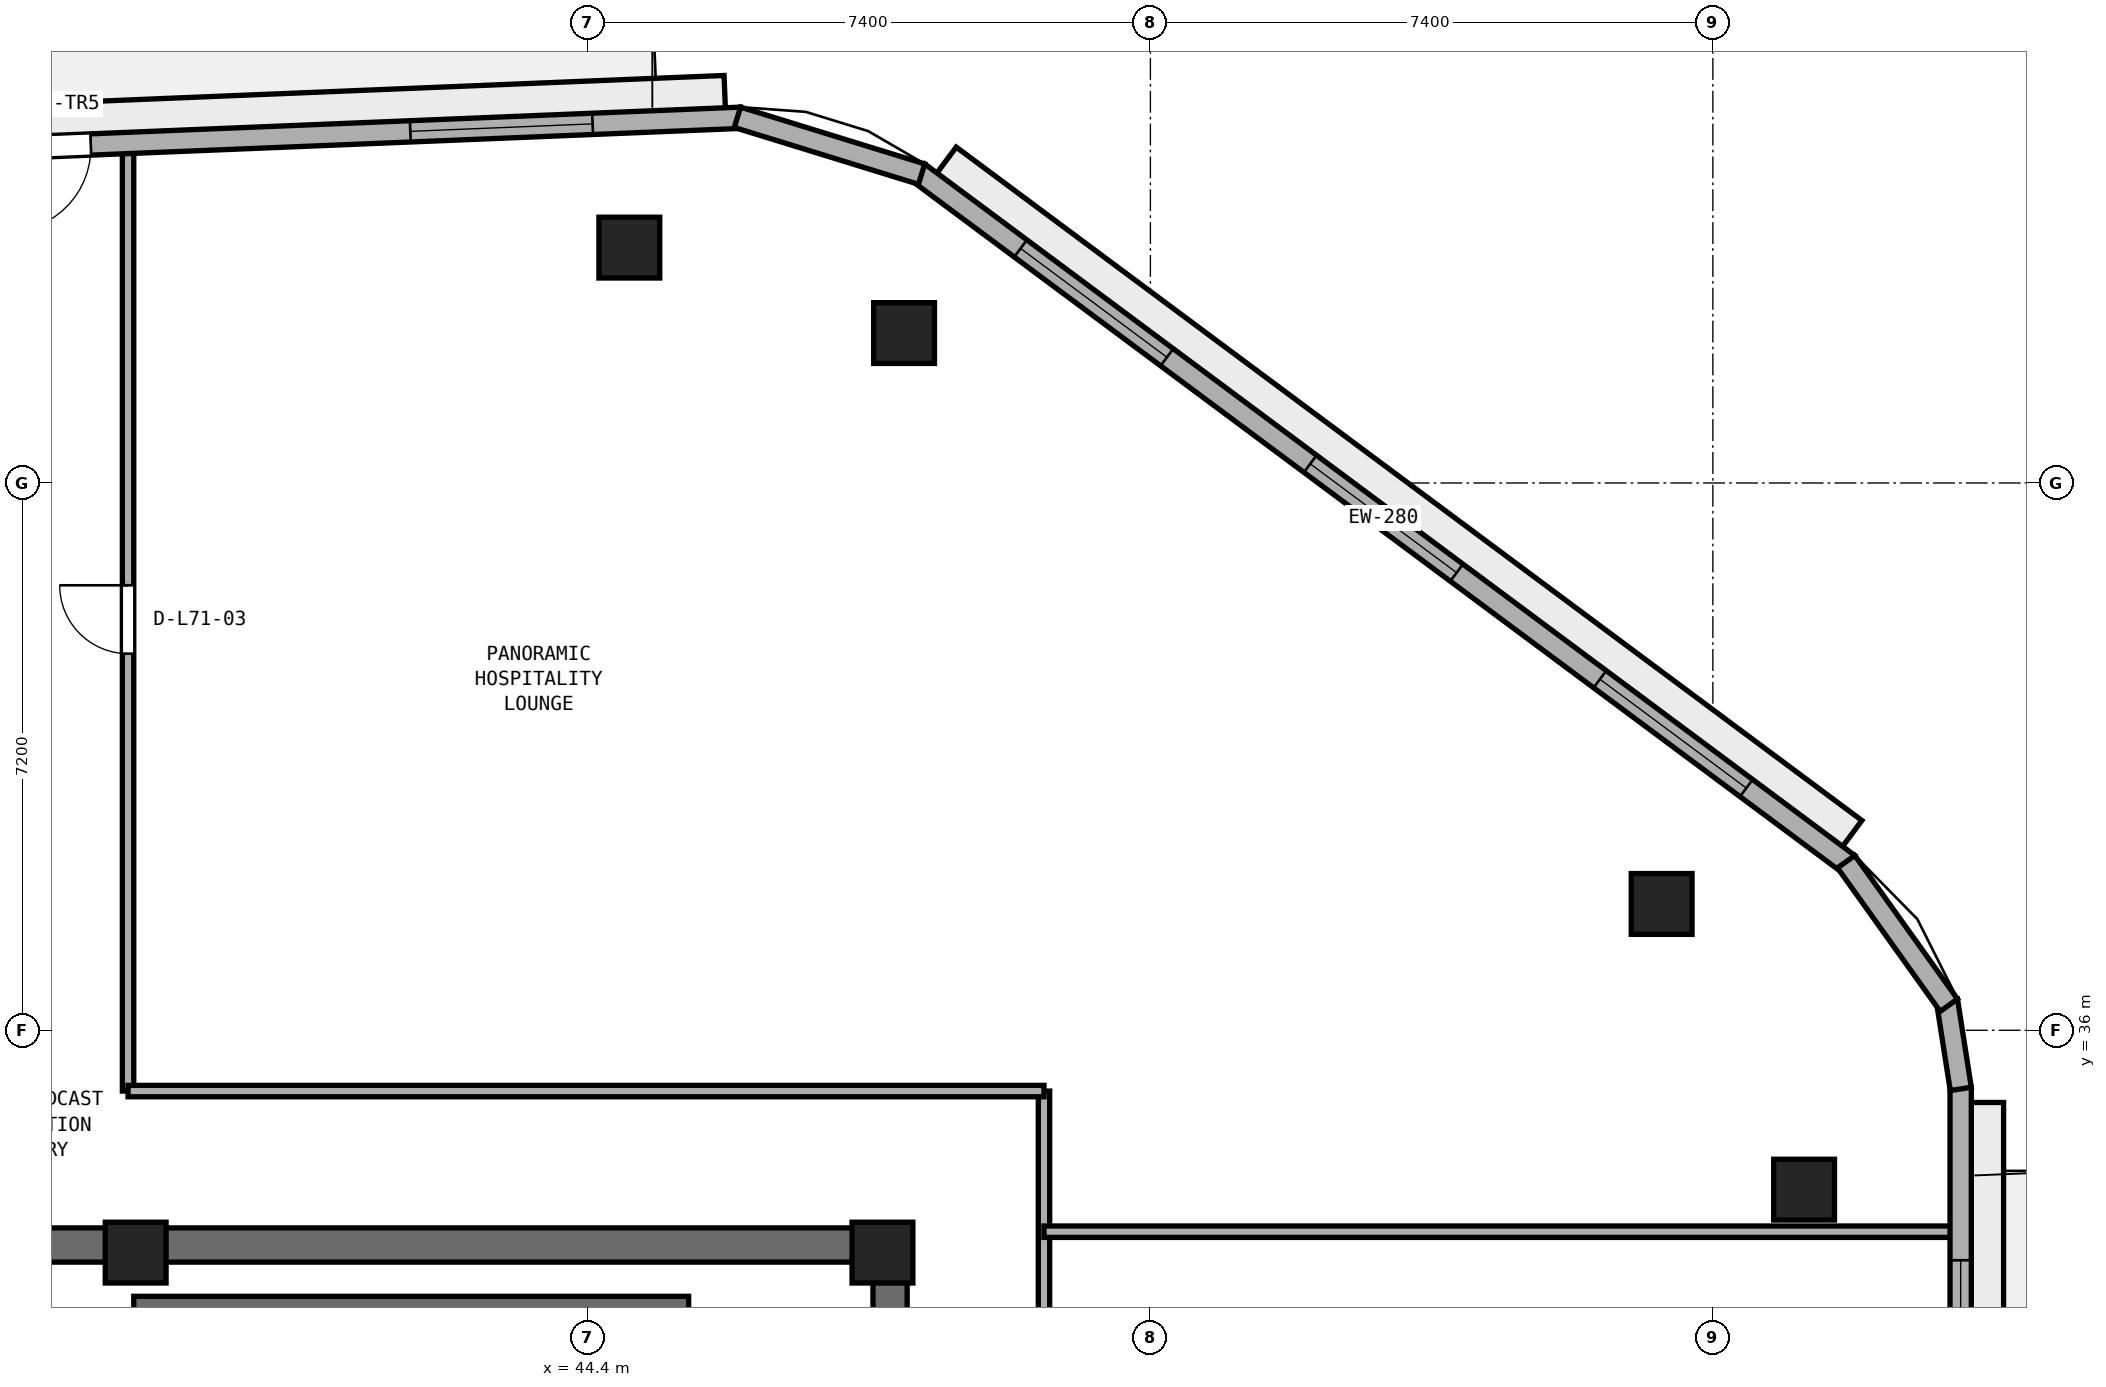
"""IFC4 building model, lengths in metres.
Left out: names, types, materials, properties, quantities, classifications, styles, units other than length and angle.
Written with IfcOpenShell. Run it as: python <this file> out.ifc"""

import sys

from ifc_helpers import new_model, si_unit, direction, frame, frame_2d, origin, origin_2d, place, context, subcontext, project, spatial, rectangle, extrude, element, fill, save


model = new_model("IFC4")
c1 = context("Model", 3, precision=1e-05, world=origin(), true_north=direction((0.0, 1.0)))
c2 = subcontext(c1, "Body", "Model", "MODEL_VIEW")
j1 = project(units=[si_unit("LENGTHUNIT", "METRE"), si_unit("PLANEANGLEUNIT", "RADIAN")], contexts=[c1])
p1 = place(None, origin())
s1 = spatial("IfcSite", under=j1, at=p1, CompositionType="ELEMENT")
p2 = place(p1, origin())
s2 = spatial("IfcBuilding", under=s1, at=p2, CompositionType="ELEMENT")
p3 = place(p2, frame((0.0, 0.0, 278.2)))
s3 = spatial("IfcBuildingStorey", under=s2, at=p3, CompositionType="ELEMENT", Elevation=278.2)
p4 = place(p3, frame((25.4, 33.175, 0.0), z_axis=(0.0, 0.0, 1.0), x_axis=(1.0, 0.0, 0.0)))
e1 = element("IfcWall", 1, at=p4, inside=s3, PredefinedType="SHEAR", context=c2, shape_type="SweptSolid", body=[
    extrude(rectangle(XDim=23.2, YDim=0.45, at=frame_2d((11.6, 0.0))), origin(), (0.0, 0.0, 1.0), 3.54),
])
p5 = place(p3, frame((48.375, 17.45, 0.0), z_axis=(0.0, 0.0, 1.0), x_axis=(0.0, 1.0, 0.0)))
e2 = element("IfcWall", 2, at=p5, inside=s3, PredefinedType="SHEAR", context=c2, shape_type="SweptSolid", body=[
    extrude(rectangle(XDim=15.5, YDim=0.45, at=frame_2d((7.75, 0.0))), origin(), (0.0, 0.0, 1.0), 3.54),
])
p6 = place(p5, frame((5.85, 0.0, 0.0)))
e3 = element("IfcOpeningElement", 3, at=p6, cuts=e2, PredefinedType="OPENING", context=c2, shape_type="SweptSolid", body=[
    extrude(rectangle(XDim=1.5, YDim=2.15, at=frame_2d((0.75, 1.075))), frame((0.0, 0.235, 0.0), z_axis=(0.0, -1.0, 0.0), x_axis=(1.0, 0.0, 0.0)), (0.0, 0.0, 1.0), 0.47),
])
for number, where, z_axis, x_axis in (
    (4, (48.275, 33.075, 0.0), (0.0, 0.0, 1.0), (1.0, 0.0, 0.0)),
    (5, (38.45, 33.075, 0.0), (0.0, 0.0, 1.0), (1.0, 0.0, 0.0)),
):
    element("IfcColumn", number, at=place(p3, frame(where, z_axis=z_axis, x_axis=x_axis)), inside=s3, PredefinedType="PILASTER", context=c2, shape_type="SweptSolid", body=[
        extrude(rectangle(XDim=0.8, YDim=0.8, at=origin_2d()), origin(), (0.0, 0.0, 1.0), 3.8),
    ])
for number, where, z_axis, x_axis in (
    (6, (60.4, 33.903, 0.0), (0.0, 0.0, 1.0), (1.0, 0.0, 0.0)),
    (7, (58.526, 37.662, 0.0), (0.0, 0.0, 1.0), (1.0, 0.0, 0.0)),
    (8, (48.559, 45.173, 0.0), (0.0, 0.0, 1.0), (1.0, 0.0, 0.0)),
    (9, (44.945, 46.297, 0.0), (0.0, 0.0, 1.0), (1.0, 0.0, 0.0)),
):
    element("IfcColumn", number, at=place(p3, frame(where, z_axis=z_axis, x_axis=x_axis)), inside=s3, PredefinedType="COLUMN", context=c2, shape_type="SweptSolid", body=[
        extrude(rectangle(XDim=0.8, YDim=0.8, at=origin_2d()), origin(), (0.0, 0.0, 1.0), 3.8),
    ])
p7 = place(p3, frame((38.425, 32.375, 0.0), z_axis=(0.0, 0.0, 1.0), x_axis=(1.0, 0.0, 0.0)))
e10 = element("IfcWall", 10, at=p7, inside=s3, PredefinedType="SHEAR", context=c2, shape_type="SweptSolid", body=[
    extrude(rectangle(XDim=7.3, YDim=0.25, at=frame_2d((3.65, 0.0))), origin(), (0.0, 0.0, 1.0), 3.54),
])
p8 = place(p3, frame((50.4, 22.6, 0.0), z_axis=(0.0, 0.0, 1.0), x_axis=(0.0, 1.0, 0.0)))
e11 = element("IfcWall", 11, at=p8, inside=s3, PredefinedType="PARTITIONING", context=c2, shape_type="SweptSolid", body=[
    extrude(rectangle(XDim=12.6, YDim=0.15, at=frame_2d((6.3, 0.0))), origin(), (0.0, 0.0, 1.0), 3.54),
])
p9 = place(p8, frame((3.22, 0.0, 0.0)))
e12 = element("IfcOpeningElement", 12, at=p9, cuts=e11, PredefinedType="OPENING", context=c2, shape_type="SweptSolid", body=[
    extrude(rectangle(XDim=1.0, YDim=2.12, at=frame_2d((0.5, 1.06))), frame((0.0, 0.085, 0.0), z_axis=(0.0, -1.0, 0.0), x_axis=(1.0, 0.0, 0.0)), (0.0, 0.0, 1.0), 0.17),
])
p10 = place(p8, frame((8.525, 0.0, 0.0)))
e13 = element("IfcOpeningElement", 13, at=p10, cuts=e11, PredefinedType="OPENING", context=c2, shape_type="SweptSolid", body=[
    extrude(rectangle(XDim=0.9, YDim=2.1, at=frame_2d((0.45, 1.05))), frame((0.0, 0.085, 0.0), z_axis=(0.0, -1.0, 0.0), x_axis=(1.0, 0.0, 0.0)), (0.0, 0.0, 1.0), 0.17),
])
p11 = place(p3, frame((38.35, 35.2, 0.0), z_axis=(0.0, 0.0, 1.0), x_axis=(0.0, 1.0, 0.0)))
e14 = element("IfcWall", 14, at=p11, inside=s3, PredefinedType="PARTITIONING", context=c2, shape_type="SweptSolid", body=[
    extrude(rectangle(XDim=12.409, YDim=0.15, at=frame_2d((6.204, 0.0))), origin(), (0.0, 0.0, 1.0), 3.54),
])
p12 = place(p11, frame((5.754, 0.0, 0.0)))
e15 = element("IfcOpeningElement", 15, at=p12, cuts=e14, PredefinedType="OPENING", context=c2, shape_type="SweptSolid", body=[
    extrude(rectangle(XDim=0.9, YDim=2.1, at=frame_2d((0.45, 1.05))), frame((0.0, 0.085, 0.0), z_axis=(0.0, -1.0, 0.0), x_axis=(1.0, 0.0, 0.0)), (0.0, 0.0, 1.0), 0.17),
])
p13 = place(p3, frame((50.4, 33.35, 0.0), z_axis=(0.0, 0.0, 1.0), x_axis=(1.0, 0.0, 0.0)))
e16 = element("IfcWall", 16, at=p13, inside=s3, PredefinedType="PARTITIONING", context=c2, shape_type="SweptSolid", body=[
    extrude(rectangle(XDim=11.995, YDim=0.15, at=frame_2d((5.998, 0.0))), origin(), (0.0, 0.0, 1.0), 2.923),
])
p14 = place(p3, frame((38.35, 35.2, 0.0), z_axis=(0.0, 0.0, 1.0), x_axis=(1.0, 0.0, 0.0)))
e17 = element("IfcWall", 17, at=p14, inside=s3, PredefinedType="PARTITIONING", context=c2, shape_type="SweptSolid", body=[
    extrude(rectangle(XDim=12.05, YDim=0.15, at=frame_2d((6.025, 0.0))), origin(), (0.0, 0.0, 1.0), 3.54),
])
p15 = place(p3, frame((62.46, 16.396, 0.0), z_axis=(0.0, 0.0, 1.0), x_axis=(0.0, 1.0, 0.0)))
e18 = element("IfcWall", 18, at=p15, inside=s3, PredefinedType="STANDARD", context=c2, shape_type="SweptSolid", body=[
    extrude(rectangle(XDim=18.854, YDim=0.28, at=frame_2d((9.427, 0.0))), origin(), (0.0, 0.0, 1.0), 3.54),
])
p16 = place(p15, frame((8.877, 0.0, 0.0)))
e19 = element("IfcOpeningElement", 19, at=p16, cuts=e18, PredefinedType="OPENING", context=c2, shape_type="SweptSolid", body=[
    extrude(rectangle(XDim=1.1, YDim=2.2, at=frame_2d((0.55, 1.1))), frame((0.0, 0.15, 0.0), z_axis=(0.0, -1.0, 0.0), x_axis=(1.0, 0.0, 0.0)), (0.0, 0.0, 1.0), 0.3),
])
p17 = place(p15, frame((2.276, 0.0, 0.9)))
e20 = element("IfcOpeningElement", 20, at=p17, cuts=e18, PredefinedType="OPENING", context=c2, shape_type="SweptSolid", body=[
    extrude(rectangle(XDim=2.4, YDim=1.75, at=frame_2d((1.2, 0.875))), frame((0.0, 0.15, 0.0), z_axis=(0.0, -1.0, 0.0), x_axis=(1.0, 0.0, 0.0)), (0.0, 0.0, 1.0), 0.3),
])
p18 = place(p15, frame((14.179, 0.0, 0.9)))
e21 = element("IfcOpeningElement", 21, at=p18, cuts=e18, PredefinedType="OPENING", context=c2, shape_type="SweptSolid", body=[
    extrude(rectangle(XDim=2.4, YDim=1.75, at=frame_2d((1.2, 0.875))), frame((0.0, 0.15, 0.0), z_axis=(0.0, -1.0, 0.0), x_axis=(1.0, 0.0, 0.0)), (0.0, 0.0, 1.0), 0.3),
])
p19 = place(p3, frame((60.984, 38.187, 0.0), z_axis=(0.0, 0.0, 1.0), x_axis=(-0.802485144343, 0.596672098484, 0.0)))
e22 = element("IfcWall", 22, at=p19, inside=s3, PredefinedType="STANDARD", context=c2, shape_type="SweptSolid", body=[
    extrude(rectangle(XDim=15.248, YDim=0.28, at=frame_2d((7.624, 0.0))), origin(), (0.0, 0.0, 1.0), 3.54),
])
p20 = place(p19, frame((1.675, 0.0, 0.9)))
e23 = element("IfcOpeningElement", 23, at=p20, cuts=e22, PredefinedType="OPENING", context=c2, shape_type="SweptSolid", body=[
    extrude(rectangle(XDim=2.4, YDim=1.75, at=frame_2d((1.2, 0.875))), frame((0.0, 0.15, 0.0), z_axis=(0.0, -1.0, 0.0), x_axis=(1.0, 0.0, 0.0)), (0.0, 0.0, 1.0), 0.3),
])
p21 = place(p19, frame((6.424, 0.0, 0.9)))
e24 = element("IfcOpeningElement", 24, at=p21, cuts=e22, PredefinedType="OPENING", context=c2, shape_type="SweptSolid", body=[
    extrude(rectangle(XDim=2.4, YDim=1.75, at=frame_2d((1.2, 0.875))), frame((0.0, 0.15, 0.0), z_axis=(0.0, -1.0, 0.0), x_axis=(1.0, 0.0, 0.0)), (0.0, 0.0, 1.0), 0.3),
])
p22 = place(p19, frame((11.173, 0.0, 0.9)))
e25 = element("IfcOpeningElement", 25, at=p22, cuts=e22, PredefinedType="OPENING", context=c2, shape_type="SweptSolid", body=[
    extrude(rectangle(XDim=2.4, YDim=1.75, at=frame_2d((1.2, 0.875))), frame((0.0, 0.15, 0.0), z_axis=(0.0, -1.0, 0.0), x_axis=(1.0, 0.0, 0.0)), (0.0, 0.0, 1.0), 0.3),
])
p23 = place(p3, frame((46.414, 48.005, 0.0), z_axis=(0.0, 0.0, 1.0), x_axis=(-0.999156194126, -0.041071885021, 0.0)))
e26 = element("IfcWall", 26, at=p23, inside=s3, PredefinedType="STANDARD", context=c2, shape_type="SweptSolid", body=[
    extrude(rectangle(XDim=16.923, YDim=0.28, at=frame_2d((8.461, 0.0))), origin(), (0.0, 0.0, 1.0), 3.54),
])
p24 = place(p23, frame((8.562, 0.0, 0.0)))
e27 = element("IfcOpeningElement", 27, at=p24, cuts=e26, PredefinedType="OPENING", context=c2, shape_type="SweptSolid", body=[
    extrude(rectangle(XDim=1.1, YDim=2.2, at=frame_2d((0.55, 1.1))), frame((0.0, 0.15, 0.0), z_axis=(0.0, -1.0, 0.0), x_axis=(1.0, 0.0, 0.0)), (0.0, 0.0, 1.0), 0.3),
])
p25 = place(p23, frame((1.954, 0.0, 0.9)))
e28 = element("IfcOpeningElement", 28, at=p25, cuts=e26, PredefinedType="OPENING", context=c2, shape_type="SweptSolid", body=[
    extrude(rectangle(XDim=2.4, YDim=1.75, at=frame_2d((1.2, 0.875))), frame((0.0, 0.15, 0.0), z_axis=(0.0, -1.0, 0.0), x_axis=(1.0, 0.0, 0.0)), (0.0, 0.0, 1.0), 0.3),
])
p26 = place(p23, frame((12.569, 0.0, 0.9)))
e29 = element("IfcOpeningElement", 29, at=p26, cuts=e26, PredefinedType="OPENING", context=c2, shape_type="SweptSolid", body=[
    extrude(rectangle(XDim=2.4, YDim=1.75, at=frame_2d((1.2, 0.875))), frame((0.0, 0.15, 0.0), z_axis=(0.0, -1.0, 0.0), x_axis=(1.0, 0.0, 0.0)), (0.0, 0.0, 1.0), 0.3),
])
p27 = place(p3, frame((62.462, 35.229, 0.0), z_axis=(0.0, 0.0, 1.0), x_axis=(-0.15458604025, 0.987979329824, 0.0)))
e30 = element("IfcWall", 30, at=p27, inside=s3, PredefinedType="STANDARD", context=c2, shape_type="SweptSolid", body=[
    extrude(rectangle(XDim=1.175, YDim=0.28, at=frame_2d((0.587, 0.0))), origin(), (0.0, 0.0, 1.0), 3.54),
])
p28 = place(p3, frame((62.304, 36.33, 0.0), z_axis=(0.0, 0.0, 1.0), x_axis=(-0.581795068472, 0.81333541562, 0.0)))
e31 = element("IfcWall", 31, at=p28, inside=s3, PredefinedType="STANDARD", context=c2, shape_type="SweptSolid", body=[
    extrude(rectangle(XDim=2.322, YDim=0.28, at=frame_2d((1.161, 0.0))), origin(), (0.0, 0.0, 1.0), 3.54),
])
p29 = place(p3, frame((48.79, 47.264, 0.0), z_axis=(0.0, 0.0, 1.0), x_axis=(-0.955593560977, 0.294687879322, 0.0)))
e32 = element("IfcWall", 32, at=p29, inside=s3, PredefinedType="STANDARD", context=c2, shape_type="SweptSolid", body=[
    extrude(rectangle(XDim=2.536, YDim=0.28, at=frame_2d((1.268, 0.0))), origin(), (0.0, 0.0, 1.0), 3.54),
])
p30 = place(p12, origin())
e33 = element("IfcDoor", 33, at=p30, inside=s3, OperationType="SINGLE_SWING_RIGHT", PredefinedType="DOOR", context=c2, shape_type="SweptSolid", body=[
    extrude(rectangle(XDim=0.9, YDim=2.1, at=frame_2d((0.45, 1.05))), frame((0.0, 0.025, 0.0), z_axis=(0.0, -1.0, 0.0), x_axis=(1.0, 0.0, 0.0)), (0.0, 0.0, 1.0), 0.05),
])
fill(e15, e33)
p31 = place(p18, origin())
e34 = element("IfcWindow", 34, at=p31, inside=s3, PartitioningType="SINGLE_PANEL", PredefinedType="WINDOW", context=c2, shape_type="SweptSolid", body=[
    extrude(rectangle(XDim=2.4, YDim=1.75, at=frame_2d((1.2, 0.875))), frame((0.0, 0.03, 0.0), z_axis=(0.0, -1.0, 0.0), x_axis=(1.0, 0.0, 0.0)), (0.0, 0.0, 1.0), 0.06),
])
fill(e21, e34)
p32 = place(p20, origin())
e35 = element("IfcWindow", 35, at=p32, inside=s3, PartitioningType="SINGLE_PANEL", PredefinedType="WINDOW", context=c2, shape_type="SweptSolid", body=[
    extrude(rectangle(XDim=2.4, YDim=1.75, at=frame_2d((1.2, 0.875))), frame((0.0, 0.03, 0.0), z_axis=(0.0, -1.0, 0.0), x_axis=(1.0, 0.0, 0.0)), (0.0, 0.0, 1.0), 0.06),
])
fill(e23, e35)
p33 = place(p21, origin())
e36 = element("IfcWindow", 36, at=p33, inside=s3, PartitioningType="SINGLE_PANEL", PredefinedType="WINDOW", context=c2, shape_type="SweptSolid", body=[
    extrude(rectangle(XDim=2.4, YDim=1.75, at=frame_2d((1.2, 0.875))), frame((0.0, 0.03, 0.0), z_axis=(0.0, -1.0, 0.0), x_axis=(1.0, 0.0, 0.0)), (0.0, 0.0, 1.0), 0.06),
])
fill(e24, e36)
p34 = place(p22, origin())
e37 = element("IfcWindow", 37, at=p34, inside=s3, PartitioningType="SINGLE_PANEL", PredefinedType="WINDOW", context=c2, shape_type="SweptSolid", body=[
    extrude(rectangle(XDim=2.4, YDim=1.75, at=frame_2d((1.2, 0.875))), frame((0.0, 0.03, 0.0), z_axis=(0.0, -1.0, 0.0), x_axis=(1.0, 0.0, 0.0)), (0.0, 0.0, 1.0), 0.06),
])
fill(e25, e37)
p35 = place(p24, origin())
e38 = element("IfcDoor", 38, at=p35, inside=s3, OperationType="SINGLE_SWING_RIGHT", PredefinedType="DOOR", context=c2, shape_type="SweptSolid", body=[
    extrude(rectangle(XDim=1.1, YDim=2.2, at=frame_2d((0.55, 1.1))), frame((0.0, 0.025, 0.0), z_axis=(0.0, -1.0, 0.0), x_axis=(1.0, 0.0, 0.0)), (0.0, 0.0, 1.0), 0.05),
])
fill(e27, e38)
p36 = place(p25, origin())
e39 = element("IfcWindow", 39, at=p36, inside=s3, PartitioningType="SINGLE_PANEL", PredefinedType="WINDOW", context=c2, shape_type="SweptSolid", body=[
    extrude(rectangle(XDim=2.4, YDim=1.75, at=frame_2d((1.2, 0.875))), frame((0.0, 0.03, 0.0), z_axis=(0.0, -1.0, 0.0), x_axis=(1.0, 0.0, 0.0)), (0.0, 0.0, 1.0), 0.06),
])
fill(e28, e39)
save(model, sys.argv[1])
